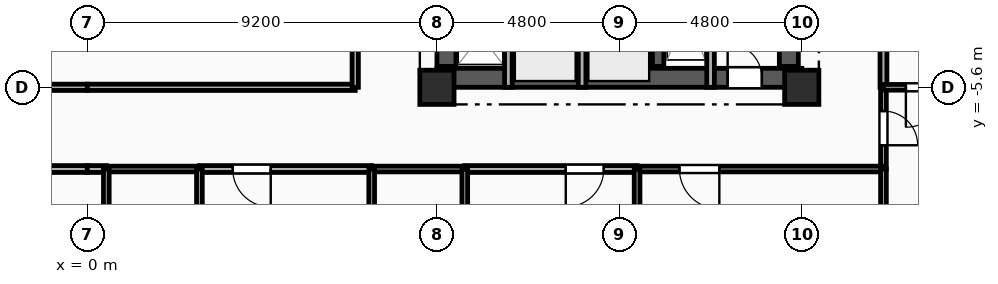
"""IFC4 building model, lengths in metres.
Left out: names, types, materials, properties, quantities, classifications, styles, units other than length and angle.
Written with IfcOpenShell. Run it as: python <this file> out.ifc"""

import sys

from ifc_helpers import new_model, si_unit, direction, frame, frame_2d, origin, origin_2d, place, context, subcontext, project, spatial, rectangle, extrude, element, fill, save


model = new_model("IFC4")
c1 = context("Model", 3, precision=1e-05, world=origin(), true_north=direction((0.0, 1.0)))
c2 = subcontext(c1, "Body", "Model", "MODEL_VIEW")
j1 = project(units=[si_unit("LENGTHUNIT", "METRE"), si_unit("PLANEANGLEUNIT", "RADIAN")], contexts=[c1])
p1 = place(None, origin())
s1 = spatial("IfcSite", under=j1, at=p1, CompositionType="ELEMENT")
p2 = place(p1, origin())
s2 = spatial("IfcBuilding", under=s1, at=p2, CompositionType="ELEMENT")
p3 = place(p2, frame((0.0, 0.0, 161.15)))
s3 = spatial("IfcBuildingStorey", under=s2, at=p3, CompositionType="ELEMENT", Elevation=161.15)
for number, where, z_axis, x_axis in (
    (1, (9.2, -5.6, 0.0), (0.0, 0.0, 1.0), (1.0, 0.0, 0.0)),
    (2, (18.8, -5.6, 0.0), (0.0, 0.0, 1.0), (1.0, 0.0, 0.0)),
):
    element("IfcColumn", number, at=place(p3, frame(where, z_axis=z_axis, x_axis=x_axis)), inside=s3, PredefinedType="COLUMN", context=c2, shape_type="SweptSolid", body=[
        extrude(rectangle(XDim=0.9, YDim=0.9, at=origin_2d()), origin(), (0.0, 0.0, 1.0), 3.35),
    ])
p4 = place(p3, frame((9.2, -5.35, 0.0), z_axis=(0.0, 0.0, 1.0), x_axis=(1.0, 0.0, 0.0)))
e3 = element("IfcWall", 3, at=p4, inside=s3, PredefinedType="SHEAR", context=c2, shape_type="SweptSolid", body=[
    extrude(rectangle(XDim=9.6, YDim=0.5, at=frame_2d((4.8, 0.0))), origin(), (0.0, 0.0, 1.0), 3.04),
])
p5 = place(p4, frame((7.65, 0.0, 0.0)))
e4 = element("IfcOpeningElement", 4, at=p5, cuts=e3, PredefinedType="OPENING", context=c2, shape_type="SweptSolid", body=[
    extrude(rectangle(XDim=0.9, YDim=2.1, at=frame_2d((0.45, 1.05))), frame((0.0, 0.26, 0.0), z_axis=(0.0, -1.0, 0.0), x_axis=(1.0, 0.0, 0.0)), (0.0, 0.0, 1.0), 0.52),
])
p6 = place(p3, frame((9.45, -5.05, 0.0), z_axis=(0.0, 0.0, 1.0), x_axis=(0.0, 1.0, 0.0)))
e5 = element("IfcWall", 5, at=p6, inside=s3, PredefinedType="SHEAR", context=c2, shape_type="SweptSolid", body=[
    extrude(rectangle(XDim=10.1, YDim=0.5, at=frame_2d((5.05, 0.0))), origin(), (0.0, 0.0, 1.0), 3.04),
])
p7 = place(p6, frame((7.15, 0.0, 0.0)))
e6 = element("IfcOpeningElement", 6, at=p7, cuts=e5, PredefinedType="OPENING", context=c2, shape_type="SweptSolid", body=[
    extrude(rectangle(XDim=0.9, YDim=2.1, at=frame_2d((0.45, 1.05))), frame((0.0, 0.26, 0.0), z_axis=(0.0, -1.0, 0.0), x_axis=(1.0, 0.0, 0.0)), (0.0, 0.0, 1.0), 0.52),
])
p8 = place(p6, frame((2.4, 0.0, 0.0)))
e7 = element("IfcOpeningElement", 7, at=p8, cuts=e5, PredefinedType="OPENING", context=c2, shape_type="SweptSolid", body=[
    extrude(rectangle(XDim=1.2, YDim=2.15, at=frame_2d((0.6, 1.075))), frame((0.0, 0.26, 0.0), z_axis=(0.0, -1.0, 0.0), x_axis=(1.0, 0.0, 0.0)), (0.0, 0.0, 1.0), 0.52),
])
p9 = place(p3, frame((18.46, -5.05, 0.0), z_axis=(0.0, 0.0, 1.0), x_axis=(0.0, 1.0, 0.0)))
e8 = element("IfcWall", 8, at=p9, inside=s3, PredefinedType="SHEAR", context=c2, shape_type="SweptSolid", body=[
    extrude(rectangle(XDim=10.1, YDim=0.5, at=frame_2d((5.05, 0.0))), origin(), (0.0, 0.0, 1.0), 3.04),
])
p10 = place(p3, frame((15.02, -5.05, 0.0), z_axis=(0.0, 0.0, 1.0), x_axis=(0.0, 1.0, 0.0)))
e9 = element("IfcWall", 9, at=p10, inside=s3, PredefinedType="SHEAR", context=c2, shape_type="SweptSolid", body=[
    extrude(rectangle(XDim=10.1, YDim=0.3, at=frame_2d((5.05, 0.0))), origin(), (0.0, 0.0, 1.0), 3.04),
])
p11 = place(p3, frame((16.4, -2.11, 0.0), z_axis=(0.0, 0.0, 1.0), x_axis=(0.0, -1.0, 0.0)))
e10 = element("IfcWall", 10, at=p11, inside=s3, PredefinedType="PARTITIONING", context=c2, shape_type="SweptSolid", body=[
    extrude(rectangle(XDim=3.49, YDim=0.2, at=frame_2d((1.745, 0.0))), origin(), (0.0, 0.0, 1.0), 3.04),
])
for number, where, z_axis, x_axis in (
    (11, (11.08, -5.6, 0.0), (0.0, 0.0, 1.0), (0.0, 1.0, 0.0)),
    (12, (13.02, -5.6, 0.0), (0.0, 0.0, 1.0), (0.0, 1.0, 0.0)),
):
    element("IfcWall", number, at=place(p3, frame(where, z_axis=z_axis, x_axis=x_axis)), inside=s3, PredefinedType="PARTITIONING", context=c2, shape_type="SweptSolid", body=[
        extrude(rectangle(XDim=2.25, YDim=0.2, at=frame_2d((1.125, 0.0))), origin(), (0.0, 0.0, 1.0), 3.04),
    ])
p12 = place(p3, frame((0.0, -7.75, 0.0), z_axis=(0.0, 0.0, 1.0), x_axis=(-1.0, 0.0, 0.0)))
e13 = element("IfcWall", 13, at=p12, inside=s3, PredefinedType="PARTITIONING", context=c2, shape_type="SweptSolid", body=[
    extrude(rectangle(XDim=4.033, YDim=0.18, at=frame_2d((2.017, 0.0))), origin(), (0.0, 0.0, 1.0), 3.04),
])
p13 = place(p12, frame((1.517, 0.0, 0.0)))
e14 = element("IfcOpeningElement", 14, at=p13, cuts=e13, PredefinedType="OPENING", context=c2, shape_type="SweptSolid", body=[
    extrude(rectangle(XDim=1.0, YDim=2.15, at=frame_2d((0.5, 1.075))), frame((0.0, 0.1, 0.0), z_axis=(0.0, -1.0, 0.0), x_axis=(1.0, 0.0, 0.0)), (0.0, 0.0, 1.0), 0.2),
])
p14 = place(p3, frame((-7.05, -5.6, 0.0), z_axis=(0.0, 0.0, 1.0), x_axis=(1.0, 0.0, 0.0)))
e15 = element("IfcWall", 15, at=p14, inside=s3, PredefinedType="PARTITIONING", context=c2, shape_type="SweptSolid", body=[
    extrude(rectangle(XDim=7.05, YDim=0.165, at=frame_2d((3.525, 0.0))), origin(), (0.0, 0.0, 1.0), 2.525),
])
p15 = place(p3, frame((20.95, -5.6, 0.0), z_axis=(0.0, 0.0, 1.0), x_axis=(0.0, -1.0, 0.0)))
e16 = element("IfcWall", 16, at=p15, inside=s3, PredefinedType="PARTITIONING", context=c2, shape_type="SweptSolid", body=[
    extrude(rectangle(XDim=2.15, YDim=0.15, at=frame_2d((1.075, 0.0))), origin(), (0.0, 0.0, 1.0), 3.04),
])
p16 = place(p15, frame((0.625, 0.0, 0.0)))
e17 = element("IfcOpeningElement", 17, at=p16, cuts=e16, PredefinedType="OPENING", context=c2, shape_type="SweptSolid", body=[
    extrude(rectangle(XDim=0.9, YDim=2.1, at=frame_2d((0.45, 1.05))), frame((0.0, 0.085, 0.0), z_axis=(0.0, -1.0, 0.0), x_axis=(1.0, 0.0, 0.0)), (0.0, 0.0, 1.0), 0.17),
])
p17 = place(p3, frame((0.5, -7.75, 0.0), z_axis=(0.0, 0.0, 1.0), x_axis=(-1.0, 0.0, 0.0)))
e18 = element("IfcWall", 18, at=p17, inside=s3, PredefinedType="PARTITIONING", context=c2, shape_type="SweptSolid", body=[
    extrude(rectangle(XDim=0.5, YDim=0.18, at=frame_2d((0.25, 0.0))), origin(), (0.0, 0.0, 1.0), 3.04),
])
p18 = place(p3, frame((7.483, -7.75, 0.0), z_axis=(0.0, 0.0, 1.0), x_axis=(-1.0, 0.0, 0.0)))
e19 = element("IfcWall", 19, at=p18, inside=s3, PredefinedType="PARTITIONING", context=c2, shape_type="SweptSolid", body=[
    extrude(rectangle(XDim=4.533, YDim=0.18, at=frame_2d((2.267, 0.0))), origin(), (0.0, 0.0, 1.0), 3.04),
])
p19 = place(p18, frame((2.656, 0.0, 0.0)))
e20 = element("IfcOpeningElement", 20, at=p19, cuts=e19, PredefinedType="OPENING", context=c2, shape_type="SweptSolid", body=[
    extrude(rectangle(XDim=1.0, YDim=2.15, at=frame_2d((0.5, 1.075))), frame((0.0, 0.1, 0.0), z_axis=(0.0, -1.0, 0.0), x_axis=(1.0, 0.0, 0.0)), (0.0, 0.0, 1.0), 0.2),
])
p20 = place(p3, frame((2.95, -7.75, 0.0), z_axis=(0.0, 0.0, 1.0), x_axis=(-1.0, 0.0, 0.0)))
e21 = element("IfcWall", 21, at=p20, inside=s3, PredefinedType="PLUMBINGWALL", context=c2, shape_type="SweptSolid", body=[
    extrude(rectangle(XDim=2.45, YDim=0.15, at=frame_2d((1.225, 0.0))), origin(), (0.0, 0.0, 1.0), 3.04),
])
p21 = place(p3, frame((14.467, -7.75, 0.0), z_axis=(0.0, 0.0, 1.0), x_axis=(-1.0, 0.0, 0.0)))
e22 = element("IfcWall", 22, at=p21, inside=s3, PredefinedType="PARTITIONING", context=c2, shape_type="SweptSolid", body=[
    extrude(rectangle(XDim=4.534, YDim=0.18, at=frame_2d((2.267, 0.0))), origin(), (0.0, 0.0, 1.0), 3.04),
])
p22 = place(p21, frame((0.877, 0.0, 0.0)))
e23 = element("IfcOpeningElement", 23, at=p22, cuts=e22, PredefinedType="OPENING", context=c2, shape_type="SweptSolid", body=[
    extrude(rectangle(XDim=1.0, YDim=2.15, at=frame_2d((0.5, 1.075))), frame((0.0, 0.1, 0.0), z_axis=(0.0, -1.0, 0.0), x_axis=(1.0, 0.0, 0.0)), (0.0, 0.0, 1.0), 0.2),
])
p23 = place(p3, frame((9.933, -7.75, 0.0), z_axis=(0.0, 0.0, 1.0), x_axis=(-1.0, 0.0, 0.0)))
e24 = element("IfcWall", 24, at=p23, inside=s3, PredefinedType="PLUMBINGWALL", context=c2, shape_type="SweptSolid", body=[
    extrude(rectangle(XDim=2.45, YDim=0.15, at=frame_2d((1.225, 0.0))), origin(), (0.0, 0.0, 1.0), 3.04),
])
p24 = place(p3, frame((20.95, -7.75, 0.0), z_axis=(0.0, 0.0, 1.0), x_axis=(-1.0, 0.0, 0.0)))
e25 = element("IfcWall", 25, at=p24, inside=s3, PredefinedType="PARTITIONING", context=c2, shape_type="SweptSolid", body=[
    extrude(rectangle(XDim=6.483, YDim=0.15, at=frame_2d((3.241, 0.0))), origin(), (0.0, 0.0, 1.0), 3.04),
])
p25 = place(p24, frame((4.319, 0.0, 0.0)))
e26 = element("IfcOpeningElement", 26, at=p25, cuts=e25, PredefinedType="OPENING", context=c2, shape_type="SweptSolid", body=[
    extrude(rectangle(XDim=1.05, YDim=2.15, at=frame_2d((0.525, 1.075))), frame((0.0, 0.085, 0.0), z_axis=(0.0, -1.0, 0.0), x_axis=(1.0, 0.0, 0.0)), (0.0, 0.0, 1.0), 0.17),
])
p26 = place(p3, frame((0.0, -5.6, 0.0), z_axis=(0.0, 0.0, 1.0), x_axis=(1.0, 0.0, 0.0)))
e27 = element("IfcWall", 27, at=p26, inside=s3, PredefinedType="PARTITIONING", context=c2, shape_type="SweptSolid", body=[
    extrude(rectangle(XDim=7.05, YDim=0.165, at=frame_2d((3.525, 0.0))), origin(), (0.0, 0.0, 1.0), 2.525),
])
p27 = place(p3, frame((20.95, 8.5, 0.0), z_axis=(0.0, 0.0, 1.0), x_axis=(0.0, -1.0, 0.0)))
e28 = element("IfcWall", 28, at=p27, inside=s3, PredefinedType="PARTITIONING", context=c2, shape_type="SweptSolid", body=[
    extrude(rectangle(XDim=14.1, YDim=0.18, at=frame_2d((7.05, 0.0))), origin(), (0.0, 0.0, 1.0), 3.04),
])
p28 = place(p27, frame((8.042, 0.0, 0.0)))
e29 = element("IfcOpeningElement", 29, at=p28, cuts=e28, PredefinedType="OPENING", context=c2, shape_type="SweptSolid", body=[
    extrude(rectangle(XDim=1.0, YDim=2.15, at=frame_2d((0.5, 1.075))), frame((0.0, 0.1, 0.0), z_axis=(0.0, -1.0, 0.0), x_axis=(1.0, 0.0, 0.0)), (0.0, 0.0, 1.0), 0.2),
])
p29 = place(p3, frame((7.05, -5.6, 0.0), z_axis=(0.0, 0.0, 1.0), x_axis=(0.0, 1.0, 0.0)))
e30 = element("IfcWall", 30, at=p29, inside=s3, PredefinedType="PARTITIONING", context=c2, shape_type="SweptSolid", body=[
    extrude(rectangle(XDim=2.65, YDim=0.165, at=frame_2d((1.325, 0.0))), origin(), (0.0, 0.0, 1.0), 3.04),
])
p30 = place(p3, frame((23.18, -5.6, 0.0), z_axis=(0.0, 0.0, 1.0), x_axis=(-1.0, 0.0, 0.0)))
e31 = element("IfcWall", 31, at=p30, inside=s3, PredefinedType="PARTITIONING", context=c2, shape_type="SweptSolid", body=[
    extrude(rectangle(XDim=2.23, YDim=0.15, at=frame_2d((1.115, 0.0))), origin(), (0.0, 0.0, 1.0), 3.04),
])
p31 = place(p30, frame((0.59, 0.0, 0.0)))
e32 = element("IfcOpeningElement", 32, at=p31, cuts=e31, PredefinedType="OPENING", context=c2, shape_type="SweptSolid", body=[
    extrude(rectangle(XDim=1.05, YDim=2.15, at=frame_2d((0.525, 1.075))), frame((0.0, 0.085, 0.0), z_axis=(0.0, -1.0, 0.0), x_axis=(1.0, 0.0, 0.0)), (0.0, 0.0, 1.0), 0.17),
])
p32 = place(p3, frame((20.95, -15.6, 0.0), z_axis=(0.0, 0.0, 1.0), x_axis=(0.0, 1.0, 0.0)))
e33 = element("IfcWall", 33, at=p32, inside=s3, PredefinedType="PARTITIONING", context=c2, shape_type="SweptSolid", body=[
    extrude(rectangle(XDim=7.85, YDim=0.15, at=frame_2d((3.925, 0.0))), origin(), (0.0, 0.0, 1.0), 3.04),
])
for number, where, z_axis, x_axis in (
    (34, (0.5, -7.75, 0.0), (0.0, 0.0, 1.0), (0.0, -1.0, 0.0)),
    (35, (2.95, -9.9, 0.0), (0.0, 0.0, 1.0), (0.0, 1.0, 0.0)),
    (36, (7.483, -7.75, 0.0), (0.0, 0.0, 1.0), (0.0, -1.0, 0.0)),
    (37, (9.933, -9.9, 0.0), (0.0, 0.0, 1.0), (0.0, 1.0, 0.0)),
):
    element("IfcWall", number, at=place(p3, frame(where, z_axis=z_axis, x_axis=x_axis)), inside=s3, PredefinedType="PLUMBINGWALL", context=c2, shape_type="SweptSolid", body=[
        extrude(rectangle(XDim=2.15, YDim=0.15, at=frame_2d((1.075, 0.0))), origin(), (0.0, 0.0, 1.0), 3.04),
    ])
p33 = place(p3, frame((14.467, -7.75, 0.0), z_axis=(0.0, 0.0, 1.0), x_axis=(0.0, -1.0, 0.0)))
e38 = element("IfcWall", 38, at=p33, inside=s3, PredefinedType="PARTITIONING", context=c2, shape_type="SweptSolid", body=[
    extrude(rectangle(XDim=7.85, YDim=0.15, at=frame_2d((3.925, 0.0))), origin(), (0.0, 0.0, 1.0), 3.04),
])
p34 = place(p5, origin())
e39 = element("IfcDoor", 39, at=p34, inside=s3, OperationType="SINGLE_SWING_LEFT", PredefinedType="DOOR", context=c2, shape_type="SweptSolid", body=[
    extrude(rectangle(XDim=0.9, YDim=2.1, at=frame_2d((0.45, 1.05))), frame((0.0, 0.025, 0.0), z_axis=(0.0, -1.0, 0.0), x_axis=(1.0, 0.0, 0.0)), (0.0, 0.0, 1.0), 0.05),
])
fill(e4, e39)
p35 = place(p16, origin())
e40 = element("IfcDoor", 40, at=p35, inside=s3, OperationType="SINGLE_SWING_RIGHT", PredefinedType="DOOR", context=c2, shape_type="SweptSolid", body=[
    extrude(rectangle(XDim=0.9, YDim=2.1, at=frame_2d((0.45, 1.05))), frame((0.0, 0.025, 0.0), z_axis=(0.0, -1.0, 0.0), x_axis=(1.0, 0.0, 0.0)), (0.0, 0.0, 1.0), 0.05),
])
fill(e17, e40)
p36 = place(p19, origin())
e41 = element("IfcDoor", 41, at=p36, inside=s3, OperationType="SINGLE_SWING_LEFT", PredefinedType="DOOR", context=c2, shape_type="SweptSolid", body=[
    extrude(rectangle(XDim=1.0, YDim=2.15, at=frame_2d((0.5, 1.075))), frame((0.0, 0.025, 0.0), z_axis=(0.0, -1.0, 0.0), x_axis=(1.0, 0.0, 0.0)), (0.0, 0.0, 1.0), 0.05),
])
fill(e20, e41)
p37 = place(p22, origin())
e42 = element("IfcDoor", 42, at=p37, inside=s3, OperationType="SINGLE_SWING_RIGHT", PredefinedType="DOOR", context=c2, shape_type="SweptSolid", body=[
    extrude(rectangle(XDim=1.0, YDim=2.15, at=frame_2d((0.5, 1.075))), frame((0.0, 0.025, 0.0), z_axis=(0.0, -1.0, 0.0), x_axis=(1.0, 0.0, 0.0)), (0.0, 0.0, 1.0), 0.05),
])
fill(e23, e42)
p38 = place(p25, origin())
e43 = element("IfcDoor", 43, at=p38, inside=s3, OperationType="SINGLE_SWING_LEFT", PredefinedType="DOOR", context=c2, shape_type="SweptSolid", body=[
    extrude(rectangle(XDim=1.05, YDim=2.15, at=frame_2d((0.525, 1.075))), frame((0.0, 0.025, 0.0), z_axis=(0.0, -1.0, 0.0), x_axis=(1.0, 0.0, 0.0)), (0.0, 0.0, 1.0), 0.05),
])
fill(e26, e43)
p39 = place(p31, origin())
e44 = element("IfcDoor", 44, at=p39, inside=s3, OperationType="SINGLE_SWING_RIGHT", PredefinedType="DOOR", context=c2, shape_type="SweptSolid", body=[
    extrude(rectangle(XDim=1.05, YDim=2.15, at=frame_2d((0.525, 1.075))), frame((0.0, 0.025, 0.0), z_axis=(0.0, -1.0, 0.0), x_axis=(1.0, 0.0, 0.0)), (0.0, 0.0, 1.0), 0.05),
])
fill(e32, e44)
save(model, sys.argv[1])
